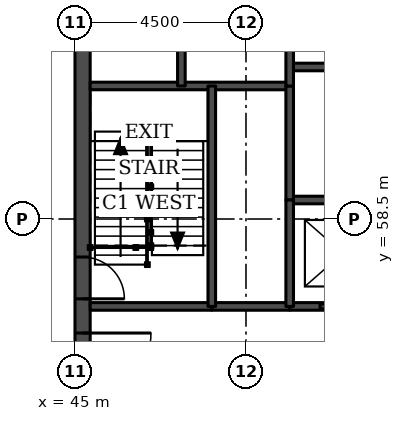
"""IFC4 building model, lengths in metres.
Left out: names, types, materials, properties, quantities, classifications, styles, units other than length and angle.
Written with IfcOpenShell. Run it as: python <this file> out.ifc"""

import sys

from ifc_helpers import new_model, si_unit, direction, frame, frame_2d, origin, place, context, subcontext, project, spatial, rectangle, extrude, element, fill, save


model = new_model("IFC4")
c1 = context("Model", 3, precision=1e-05, world=origin(), true_north=direction((0.0, 1.0)))
c2 = subcontext(c1, "Body", "Model", "MODEL_VIEW")
j1 = project(units=[si_unit("LENGTHUNIT", "METRE"), si_unit("PLANEANGLEUNIT", "RADIAN")], contexts=[c1])
p1 = place(None, origin())
s1 = spatial("IfcSite", under=j1, at=p1, CompositionType="ELEMENT")
p2 = place(p1, origin())
s2 = spatial("IfcBuilding", under=s1, at=p2, CompositionType="ELEMENT")
p3 = place(p2, frame((0.0, 0.0, 147.7)))
s3 = spatial("IfcBuildingStorey", under=s2, at=p3, CompositionType="ELEMENT", Elevation=147.7)
p4 = place(p3, frame((45.2, 49.5, 0.0), z_axis=(0.0, 0.0, 1.0), x_axis=(0.0, 1.0, 0.0)))
e1 = element("IfcWall", 1, at=p4, inside=s3, PredefinedType="SHEAR", context=c2, shape_type="SweptSolid", body=[
    extrude(rectangle(XDim=22.5, YDim=0.4, at=frame_2d((11.25, 0.0))), origin(), (0.0, 0.0, 1.0), 3.7),
])
p5 = place(p4, frame((4.2, 0.0, 0.0)))
e2 = element("IfcOpeningElement", 2, at=p5, cuts=e1, PredefinedType="OPENING", context=c2, shape_type="SweptSolid", body=[
    extrude(rectangle(XDim=1.8, YDim=2.1, at=frame_2d((0.9, 1.05))), frame((0.0, 0.21, 0.0), z_axis=(0.0, -1.0, 0.0), x_axis=(1.0, 0.0, 0.0)), (0.0, 0.0, 1.0), 0.42),
])
p6 = place(p4, frame((6.9, 0.0, 0.0)))
e3 = element("IfcOpeningElement", 3, at=p6, cuts=e1, PredefinedType="OPENING", context=c2, shape_type="SweptSolid", body=[
    extrude(rectangle(XDim=1.1, YDim=2.1, at=frame_2d((0.55, 1.05))), frame((0.0, 0.21, 0.0), z_axis=(0.0, -1.0, 0.0), x_axis=(1.0, 0.0, 0.0)), (0.0, 0.0, 1.0), 0.42),
])
p7 = place(p4, frame((13.6, 0.0, 0.0)))
e4 = element("IfcOpeningElement", 4, at=p7, cuts=e1, PredefinedType="OPENING", context=c2, shape_type="SweptSolid", body=[
    extrude(rectangle(XDim=1.1, YDim=2.1, at=frame_2d((0.55, 1.05))), frame((0.0, 0.21, 0.0), z_axis=(0.0, -1.0, 0.0), x_axis=(1.0, 0.0, 0.0)), (0.0, 0.0, 1.0), 0.42),
])
p8 = place(p4, frame((16.5, 0.0, 0.0)))
e5 = element("IfcOpeningElement", 5, at=p8, cuts=e1, PredefinedType="OPENING", context=c2, shape_type="SweptSolid", body=[
    extrude(rectangle(XDim=1.8, YDim=2.1, at=frame_2d((0.9, 1.05))), frame((0.0, 0.21, 0.0), z_axis=(0.0, -1.0, 0.0), x_axis=(1.0, 0.0, 0.0)), (0.0, 0.0, 1.0), 0.42),
])
p9 = place(p3, frame((48.6, 56.2, 0.0), z_axis=(0.0, 0.0, 1.0), x_axis=(1.0, 0.0, 0.0)))
e6 = element("IfcWall", 6, at=p9, inside=s3, PredefinedType="SOLIDWALL", context=c2, shape_type="SweptSolid", body=[
    extrude(rectangle(XDim=2.05, YDim=0.2, at=frame_2d((1.025, 0.0))), origin(), (0.0, 0.0, 1.0), 3.55),
])
p10 = place(p3, frame((45.4, 56.2, 0.0), z_axis=(0.0, 0.0, 1.0), x_axis=(1.0, 0.0, 0.0)))
e7 = element("IfcWall", 7, at=p10, inside=s3, PredefinedType="SOLIDWALL", context=c2, shape_type="SweptSolid", body=[
    extrude(rectangle(XDim=3.2, YDim=0.2, at=frame_2d((1.6, 0.0))), origin(), (0.0, 0.0, 1.0), 3.55),
])
p11 = place(p3, frame((50.65, 56.2, 0.0), z_axis=(0.0, 0.0, 1.0), x_axis=(1.0, 0.0, 0.0)))
e8 = element("IfcWall", 8, at=p11, inside=s3, PredefinedType="SOLIDWALL", context=c2, shape_type="SweptSolid", body=[
    extrude(rectangle(XDim=11.2, YDim=0.2, at=frame_2d((5.6, 0.0))), origin(), (0.0, 0.0, 1.0), 3.55),
])
p12 = place(p11, frame((0.8, 0.0, 0.0)))
e9 = element("IfcOpeningElement", 9, at=p12, cuts=e8, PredefinedType="OPENING", context=c2, shape_type="SweptSolid", body=[
    extrude(rectangle(XDim=1.2, YDim=2.1, at=frame_2d((0.6, 1.05))), frame((0.0, 0.11, 0.0), z_axis=(0.0, -1.0, 0.0), x_axis=(1.0, 0.0, 0.0)), (0.0, 0.0, 1.0), 0.22),
])
p13 = place(p11, frame((3.6, 0.0, 0.0)))
e10 = element("IfcOpeningElement", 10, at=p13, cuts=e8, PredefinedType="OPENING", context=c2, shape_type="SweptSolid", body=[
    extrude(rectangle(XDim=1.2, YDim=2.1, at=frame_2d((0.6, 1.05))), frame((0.0, 0.11, 0.0), z_axis=(0.0, -1.0, 0.0), x_axis=(1.0, 0.0, 0.0)), (0.0, 0.0, 1.0), 0.22),
])
p14 = place(p11, frame((6.4, 0.0, 0.0)))
e11 = element("IfcOpeningElement", 11, at=p14, cuts=e8, PredefinedType="OPENING", context=c2, shape_type="SweptSolid", body=[
    extrude(rectangle(XDim=1.2, YDim=2.1, at=frame_2d((0.6, 1.05))), frame((0.0, 0.11, 0.0), z_axis=(0.0, -1.0, 0.0), x_axis=(1.0, 0.0, 0.0)), (0.0, 0.0, 1.0), 0.22),
])
p15 = place(p11, frame((9.2, 0.0, 0.0)))
e12 = element("IfcOpeningElement", 12, at=p15, cuts=e8, PredefinedType="OPENING", context=c2, shape_type="SweptSolid", body=[
    extrude(rectangle(XDim=1.2, YDim=2.1, at=frame_2d((0.6, 1.05))), frame((0.0, 0.11, 0.0), z_axis=(0.0, -1.0, 0.0), x_axis=(1.0, 0.0, 0.0)), (0.0, 0.0, 1.0), 0.22),
])
p16 = place(p3, frame((50.65, 59.0, 0.0), z_axis=(0.0, 0.0, 1.0), x_axis=(1.0, 0.0, 0.0)))
e13 = element("IfcWall", 13, at=p16, inside=s3, PredefinedType="SOLIDWALL", context=c2, shape_type="SweptSolid", body=[
    extrude(rectangle(XDim=11.2, YDim=0.2, at=frame_2d((5.6, 0.0))), origin(), (0.0, 0.0, 1.0), 3.7),
])
p17 = place(p3, frame((45.4, 62.0, 0.0), z_axis=(0.0, 0.0, 1.0), x_axis=(1.0, 0.0, 0.0)))
e14 = element("IfcWall", 14, at=p17, inside=s3, PredefinedType="SOLIDWALL", context=c2, shape_type="SweptSolid", body=[
    extrude(rectangle(XDim=5.25, YDim=0.2, at=frame_2d((2.625, 0.0))), origin(), (0.0, 0.0, 1.0), 3.55),
])
p18 = place(p3, frame((50.65, 62.5, 0.0), z_axis=(0.0, 0.0, 1.0), x_axis=(1.0, 0.0, 0.0)))
e15 = element("IfcWall", 15, at=p18, inside=s3, PredefinedType="SOLIDWALL", context=c2, shape_type="SweptSolid", body=[
    extrude(rectangle(XDim=11.2, YDim=0.2, at=frame_2d((5.6, 0.0))), origin(), (0.0, 0.0, 1.0), 3.7),
])
p19 = place(p3, frame((47.8, 62.0, 0.0), z_axis=(0.0, 0.0, 1.0), x_axis=(0.0, 1.0, 0.0)))
e16 = element("IfcWall", 16, at=p19, inside=s3, PredefinedType="SOLIDWALL", context=c2, shape_type="SweptSolid", body=[
    extrude(rectangle(XDim=3.3, YDim=0.2, at=frame_2d((1.65, 0.0))), origin(), (0.0, 0.0, 1.0), 3.55),
])
p20 = place(p19, frame((1.1, 0.0, 0.0)))
e17 = element("IfcOpeningElement", 17, at=p20, cuts=e16, PredefinedType="OPENING", context=c2, shape_type="SweptSolid", body=[
    extrude(rectangle(XDim=1.1, YDim=2.1, at=frame_2d((0.55, 1.05))), frame((0.0, 0.11, 0.0), z_axis=(0.0, -1.0, 0.0), x_axis=(1.0, 0.0, 0.0)), (0.0, 0.0, 1.0), 0.22),
])
p21 = place(p3, frame((48.6, 56.2, 0.0), z_axis=(0.0, 0.0, 1.0), x_axis=(0.0, 1.0, 0.0)))
e18 = element("IfcWall", 18, at=p21, inside=s3, PredefinedType="SOLIDWALL", context=c2, shape_type="SweptSolid", body=[
    extrude(rectangle(XDim=5.8, YDim=0.2, at=frame_2d((2.9, 0.0))), origin(), (0.0, 0.0, 1.0), 3.55),
])
p22 = place(p3, frame((50.65, 59.0, 0.0), z_axis=(0.0, 0.0, 1.0), x_axis=(0.0, 1.0, 0.0)))
e19 = element("IfcWall", 19, at=p22, inside=s3, PredefinedType="SOLIDWALL", context=c2, shape_type="SweptSolid", body=[
    extrude(rectangle(XDim=3.0, YDim=0.2, at=frame_2d((1.5, 0.0))), origin(), (0.0, 0.0, 1.0), 3.7),
])
p23 = place(p3, frame((50.65, 56.2, 0.0), z_axis=(0.0, 0.0, 1.0), x_axis=(0.0, 1.0, 0.0)))
e20 = element("IfcWall", 20, at=p23, inside=s3, PredefinedType="SOLIDWALL", context=c2, shape_type="SweptSolid", body=[
    extrude(rectangle(XDim=2.8, YDim=0.2, at=frame_2d((1.4, 0.0))), origin(), (0.0, 0.0, 1.0), 3.55),
])
p24 = place(p3, frame((50.65, 62.0, 0.0), z_axis=(0.0, 0.0, 1.0), x_axis=(0.0, 1.0, 0.0)))
e21 = element("IfcWall", 21, at=p24, inside=s3, PredefinedType="SOLIDWALL", context=c2, shape_type="SweptSolid", body=[
    extrude(rectangle(XDim=3.3, YDim=0.2, at=frame_2d((1.65, 0.0))), origin(), (0.0, 0.0, 1.0), 3.55),
])
p25 = place(p12, origin())
e22 = element("IfcDoor", 22, at=p25, inside=s3, OperationType="DOUBLE_DOOR_SLIDING", PredefinedType="DOOR", context=c2, shape_type="SweptSolid", body=[
    extrude(rectangle(XDim=1.2, YDim=2.1, at=frame_2d((0.6, 1.05))), frame((0.0, 0.025, 0.0), z_axis=(0.0, -1.0, 0.0), x_axis=(1.0, 0.0, 0.0)), (0.0, 0.0, 1.0), 0.05),
])
fill(e9, e22)
p26 = place(p5, frame((1.8, 0.0, 0.0), z_axis=(0.0, 0.0, 1.0), x_axis=(-1.0, 0.0, 0.0)))
e23 = element("IfcDoor", 23, at=p26, inside=s3, OperationType="SINGLE_SWING_LEFT", PredefinedType="DOOR", context=c2, shape_type="SweptSolid", body=[
    extrude(rectangle(XDim=1.8, YDim=2.1, at=frame_2d((0.9, 1.05))), frame((0.0, 0.025, 0.0), z_axis=(0.0, -1.0, 0.0), x_axis=(1.0, 0.0, 0.0)), (0.0, 0.0, 1.0), 0.05),
])
fill(e2, e23)
p27 = place(p6, frame((1.1, 0.0, 0.0), z_axis=(0.0, 0.0, 1.0), x_axis=(-1.0, 0.0, 0.0)))
e24 = element("IfcDoor", 24, at=p27, inside=s3, OperationType="SINGLE_SWING_RIGHT", PredefinedType="DOOR", context=c2, shape_type="SweptSolid", body=[
    extrude(rectangle(XDim=1.1, YDim=2.1, at=frame_2d((0.55, 1.05))), frame((0.0, 0.025, 0.0), z_axis=(0.0, -1.0, 0.0), x_axis=(1.0, 0.0, 0.0)), (0.0, 0.0, 1.0), 0.05),
])
fill(e3, e24)
save(model, sys.argv[1])
